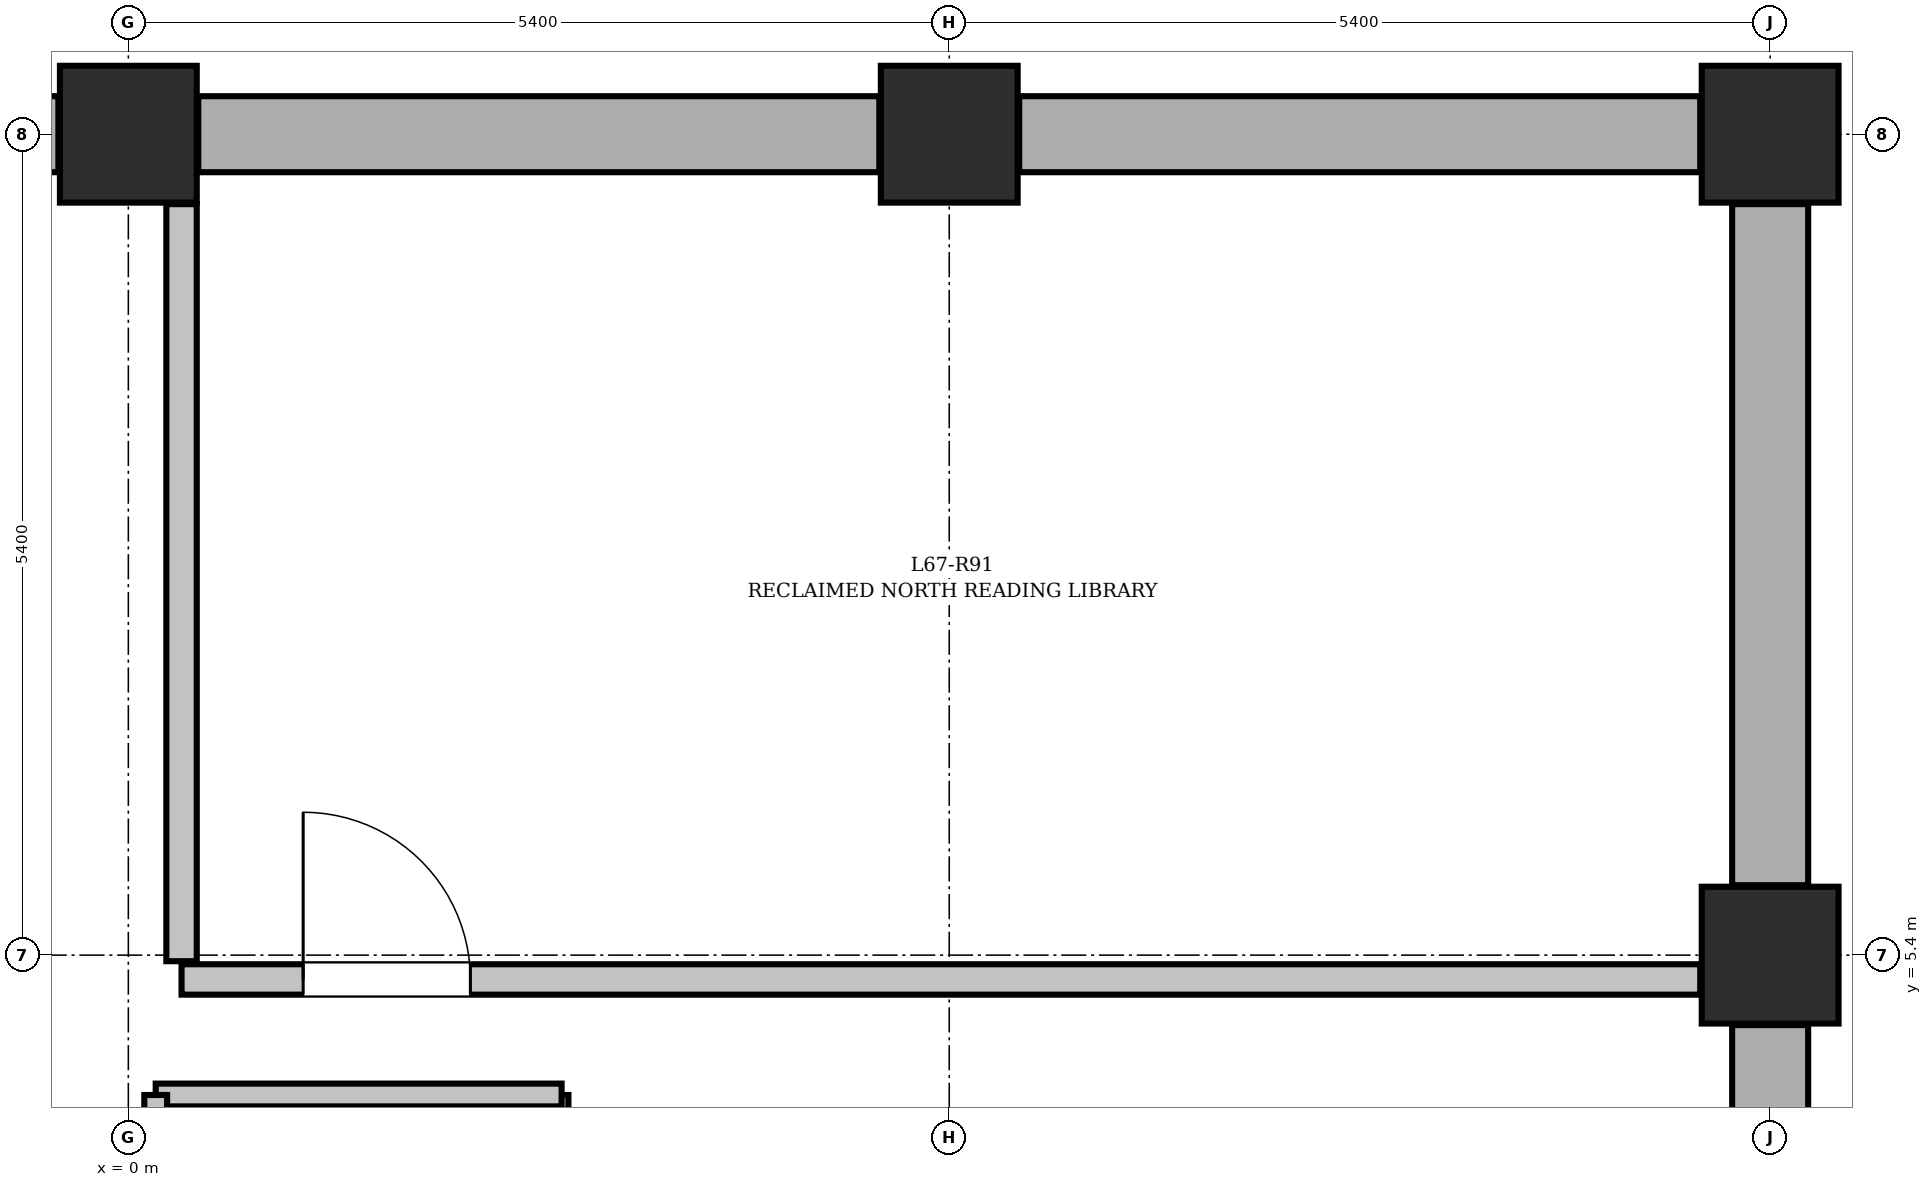
"""IFC4 building model, lengths in metres.
Left out: names, types, materials, properties, quantities, classifications, styles, units other than length and angle.
Written with IfcOpenShell. Run it as: python <this file> out.ifc"""

import sys

from ifc_helpers import new_model, si_unit, direction, frame, frame_2d, origin, origin_2d, place, context, subcontext, project, spatial, rectangle, extrude, element, fill, save


model = new_model("IFC4")
c1 = context("Model", 3, precision=1e-05, world=origin(), true_north=direction((0.0, 1.0)))
c2 = subcontext(c1, "Body", "Model", "MODEL_VIEW")
j1 = project(units=[si_unit("LENGTHUNIT", "METRE"), si_unit("PLANEANGLEUNIT", "RADIAN")], contexts=[c1])
p1 = place(None, origin())
s1 = spatial("IfcSite", under=j1, at=p1, CompositionType="ELEMENT")
p2 = place(p1, origin())
s2 = spatial("IfcBuilding", under=s1, at=p2, CompositionType="ELEMENT")
p3 = place(p2, frame((0.0, 0.0, 258.75)))
s3 = spatial("IfcBuildingStorey", under=s2, at=p3, CompositionType="ELEMENT", Elevation=258.75)
for number, where, z_axis, x_axis in (
    (1, (0.0, 10.8, 0.0), (0.0, 0.0, 1.0), (1.0, 0.0, 0.0)),
    (2, (5.4, 10.8, 0.0), (0.0, 0.0, 1.0), (1.0, 0.0, 0.0)),
    (3, (10.8, 5.4, 0.0), (0.0, 0.0, 1.0), (1.0, 0.0, 0.0)),
    (4, (10.8, 10.8, 0.0), (0.0, 0.0, 1.0), (1.0, 0.0, 0.0)),
):
    element("IfcColumn", number, at=place(p3, frame(where, z_axis=z_axis, x_axis=x_axis)), inside=s3, PredefinedType="COLUMN", context=c2, shape_type="SweptSolid", body=[
        extrude(rectangle(XDim=0.9, YDim=0.9, at=origin_2d()), origin(), (0.0, 0.0, 1.0), 3.75),
    ])
p4 = place(p3, frame((-4.94, 10.8, 0.0), z_axis=(0.0, 0.0, 1.0), x_axis=(1.0, 0.0, 0.0)))
e5 = element("IfcWall", 5, at=p4, inside=s3, PredefinedType="SHEAR", context=c2, shape_type="SweptSolid", body=[
    extrude(rectangle(XDim=4.48, YDim=0.5, at=frame_2d((2.24, 0.0))), origin(), (0.0, 0.0, 1.0), 3.75),
])
p5 = place(p4, frame((3.13, 0.0, 0.0)))
e6 = element("IfcOpeningElement", 6, at=p5, cuts=e5, PredefinedType="OPENING", context=c2, shape_type="SweptSolid", body=[
    extrude(rectangle(XDim=1.1, YDim=2.1, at=frame_2d((0.55, 1.05))), frame((0.0, 0.26, 0.0), z_axis=(0.0, -1.0, 0.0), x_axis=(1.0, 0.0, 0.0)), (0.0, 0.0, 1.0), 0.52),
])
p6 = place(p3, frame((0.46, 10.8, 0.0), z_axis=(0.0, 0.0, 1.0), x_axis=(1.0, 0.0, 0.0)))
e7 = element("IfcWall", 7, at=p6, inside=s3, PredefinedType="SHEAR", context=c2, shape_type="SweptSolid", body=[
    extrude(rectangle(XDim=4.48, YDim=0.5, at=frame_2d((2.24, 0.0))), origin(), (0.0, 0.0, 1.0), 3.75),
])
p7 = place(p3, frame((10.8, 0.46, 0.0), z_axis=(0.0, 0.0, 1.0), x_axis=(0.0, 1.0, 0.0)))
e8 = element("IfcWall", 8, at=p7, inside=s3, PredefinedType="SHEAR", context=c2, shape_type="SweptSolid", body=[
    extrude(rectangle(XDim=4.48, YDim=0.5, at=frame_2d((2.24, 0.0))), origin(), (0.0, 0.0, 1.0), 3.75),
])
p8 = place(p7, frame((1.69, 0.0, 0.0)))
e9 = element("IfcOpeningElement", 9, at=p8, cuts=e8, PredefinedType="OPENING", context=c2, shape_type="SweptSolid", body=[
    extrude(rectangle(XDim=1.1, YDim=2.1, at=frame_2d((0.55, 1.05))), frame((0.0, 0.26, 0.0), z_axis=(0.0, -1.0, 0.0), x_axis=(1.0, 0.0, 0.0)), (0.0, 0.0, 1.0), 0.52),
])
for number, where, z_axis, x_axis in (
    (10, (5.86, 10.8, 0.0), (0.0, 0.0, 1.0), (1.0, 0.0, 0.0)),
    (11, (10.8, 5.86, 0.0), (0.0, 0.0, 1.0), (0.0, 1.0, 0.0)),
):
    element("IfcWall", number, at=place(p3, frame(where, z_axis=z_axis, x_axis=x_axis)), inside=s3, PredefinedType="SHEAR", context=c2, shape_type="SweptSolid", body=[
        extrude(rectangle(XDim=4.48, YDim=0.5, at=frame_2d((2.24, 0.0))), origin(), (0.0, 0.0, 1.0), 3.75),
    ])
p9 = place(p3, frame((2.82, 1.52, 0.0), z_axis=(0.0, 0.0, 1.0), x_axis=(0.0, 1.0, 0.0)))
e12 = element("IfcWall", 12, at=p9, inside=s3, PredefinedType="PARTITIONING", context=c2, shape_type="SweptSolid", body=[
    extrude(rectangle(XDim=2.96, YDim=0.15, at=frame_2d((1.48, 0.0))), origin(), (0.0, 0.0, 1.0), 3.57),
])
p10 = place(p3, frame((0.18, 4.48, 0.0), z_axis=(0.0, 0.0, 1.0), x_axis=(1.0, 0.0, 0.0)))
e13 = element("IfcWall", 13, at=p10, inside=s3, PredefinedType="PARTITIONING", context=c2, shape_type="SweptSolid", body=[
    extrude(rectangle(XDim=2.67, YDim=0.15, at=frame_2d((1.335, 0.0))), origin(), (0.0, 0.0, 1.0), 3.57),
])
p11 = place(p3, frame((0.18, 1.52, 0.0), z_axis=(0.0, 0.0, 1.0), x_axis=(0.0, 1.0, 0.0)))
e14 = element("IfcWall", 14, at=p11, inside=s3, PredefinedType="PARTITIONING", context=c2, shape_type="SweptSolid", body=[
    extrude(rectangle(XDim=2.96, YDim=0.15, at=frame_2d((1.48, 0.0))), origin(), (0.0, 0.0, 1.0), 3.57),
])
p12 = place(p11, frame((0.95, 0.0, 0.0)))
e15 = element("IfcOpeningElement", 15, at=p12, cuts=e14, PredefinedType="OPENING", context=c2, shape_type="SweptSolid", body=[
    extrude(rectangle(XDim=0.85, YDim=2.1, at=frame_2d((0.425, 1.05))), frame((0.0, 0.085, 0.0), z_axis=(0.0, -1.0, 0.0), x_axis=(1.0, 0.0, 0.0)), (0.0, 0.0, 1.0), 0.17),
])
p13 = place(p3, frame((0.35, 5.24, 0.0), z_axis=(0.0, 0.0, 1.0), x_axis=(1.0, 0.0, 0.0)))
e16 = element("IfcWall", 16, at=p13, inside=s3, PredefinedType="PARTITIONING", context=c2, shape_type="SweptSolid", body=[
    extrude(rectangle(XDim=9.99, YDim=0.2, at=frame_2d((4.995, 0.0))), origin(), (0.0, 0.0, 1.0), 3.57),
])
p14 = place(p13, frame((0.8, 0.0, 0.0)))
e17 = element("IfcOpeningElement", 17, at=p14, cuts=e16, PredefinedType="OPENING", context=c2, shape_type="SweptSolid", body=[
    extrude(rectangle(XDim=1.1, YDim=2.1, at=frame_2d((0.55, 1.05))), frame((0.0, 0.11, 0.0), z_axis=(0.0, -1.0, 0.0), x_axis=(1.0, 0.0, 0.0)), (0.0, 0.0, 1.0), 0.22),
])
p15 = place(p3, frame((0.35, 5.36, 0.0), z_axis=(0.0, 0.0, 1.0), x_axis=(0.0, 1.0, 0.0)))
e18 = element("IfcWall", 18, at=p15, inside=s3, PredefinedType="PARTITIONING", context=c2, shape_type="SweptSolid", body=[
    extrude(rectangle(XDim=4.98, YDim=0.2, at=frame_2d((2.49, 0.0))), origin(), (0.0, 0.0, 1.0), 3.57),
])
p16 = place(p14, origin())
e19 = element("IfcDoor", 19, at=p16, inside=s3, OperationType="SINGLE_SWING_LEFT", PredefinedType="DOOR", context=c2, shape_type="SweptSolid", body=[
    extrude(rectangle(XDim=1.1, YDim=2.1, at=frame_2d((0.55, 1.05))), frame((0.0, 0.025, 0.0), z_axis=(0.0, -1.0, 0.0), x_axis=(1.0, 0.0, 0.0)), (0.0, 0.0, 1.0), 0.05),
])
fill(e17, e19)
save(model, sys.argv[1])
